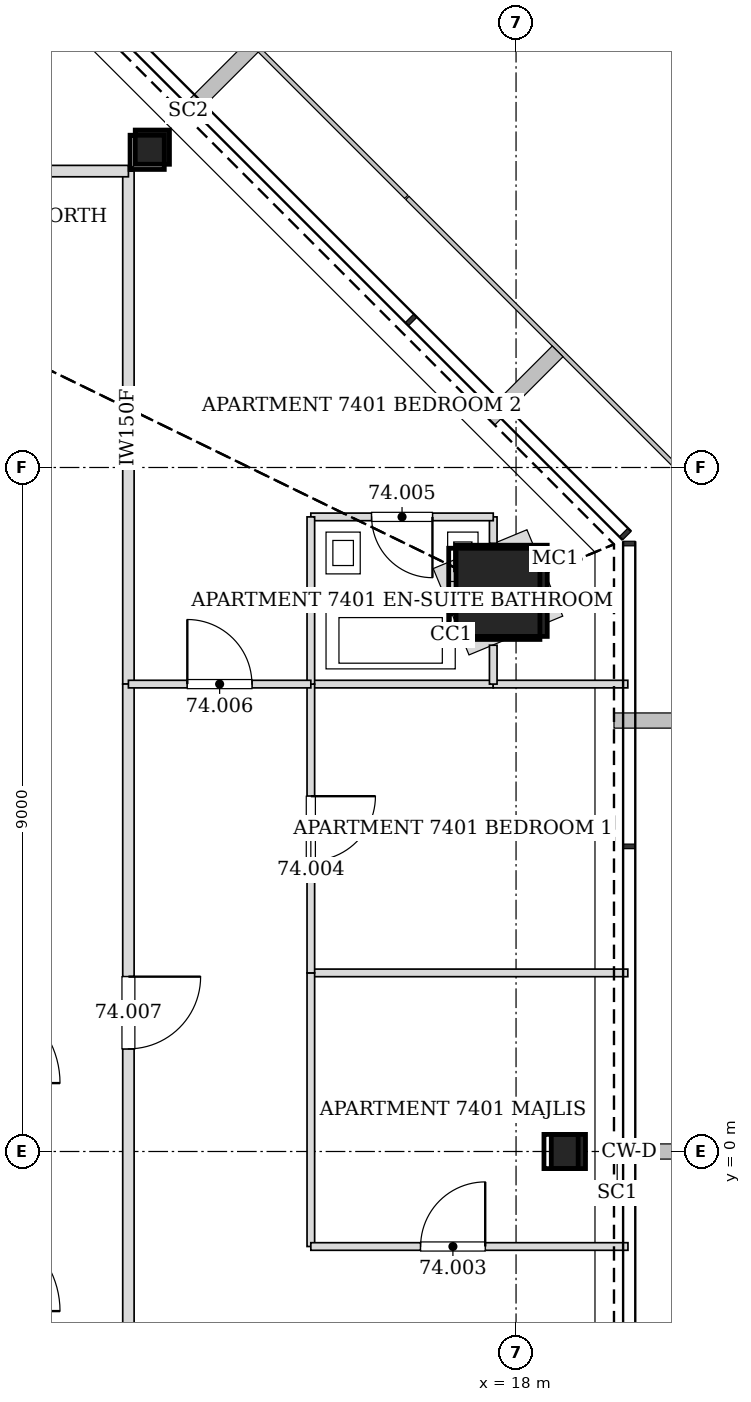
"""IFC4 building model, lengths in metres.
Left out: names, types, materials, properties, quantities, classifications, styles, units other than length and angle.
Written with IfcOpenShell. Run it as: python <this file> out.ifc"""

import sys

from ifc_helpers import new_model, si_unit, direction, frame, frame_2d, origin, origin_2d, place, context, subcontext, project, spatial, rectangle, hollow_rectangle, extrude, element, fill, save


model = new_model("IFC4")
c1 = context("Model", 3, precision=1e-05, world=origin(), true_north=direction((0.0, 1.0)))
c2 = subcontext(c1, "Body", "Model", "MODEL_VIEW")
j1 = project(units=[si_unit("LENGTHUNIT", "METRE"), si_unit("PLANEANGLEUNIT", "RADIAN")], contexts=[c1])
p1 = place(None, origin())
s1 = spatial("IfcSite", under=j1, at=p1, CompositionType="ELEMENT")
p2 = place(p1, origin())
s2 = spatial("IfcBuilding", under=s1, at=p2, CompositionType="ELEMENT")
p3 = place(p2, frame((0.0, 0.0, 301.4)))
s3 = spatial("IfcBuildingStorey", under=s2, at=p3, CompositionType="ELEMENT", Elevation=301.4)
p4 = place(p3, frame((17.81, 7.377, 0.0), z_axis=(-0.028277121884, -0.011698403216, 0.999531666202), x_axis=(0.382282742426, -0.924045401938, 0.0)))
e1 = element("IfcColumn", 1, at=p4, inside=s3, PredefinedType="COLUMN", context=c2, shape_type="SweptSolid", body=[
    extrude(hollow_rectangle(XDim=1.2, YDim=1.2, WallThickness=0.055, at=origin_2d()), origin(), (0.0, 0.0, 1.0), 3.402),
])
for number, where, z_axis, x_axis in (
    (2, (18.688, 0.0, 0.0), (-0.028, 0.0, 1.0), (0.0, -1.0, 0.0)),
    (3, (13.215, 13.215, 0.0), (-0.02, -0.02, 1.0), (0.707, -0.707, 0.0)),
):
    element("IfcColumn", number, at=place(p3, frame(where, z_axis=z_axis, x_axis=x_axis)), inside=s3, PredefinedType="COLUMN", context=c2, shape_type="SweptSolid", body=[
        extrude(hollow_rectangle(XDim=0.45, YDim=0.45, WallThickness=0.02, at=origin_2d()), origin(), (0.0, 0.0, 1.0), 3.402),
    ])
p5 = place(p3, frame((12.9, 6.149, 0.0), z_axis=(0.0, 0.0, 1.0), x_axis=(0.0, 1.0, 0.0)))
e4 = element("IfcWall", 4, at=p5, inside=s3, PredefinedType="PARTITIONING", context=c2, shape_type="SweptSolid", body=[
    extrude(rectangle(XDim=6.751, YDim=0.15, at=frame_2d((3.375, 0.0))), origin(), (0.0, 0.0, 1.0), 2.436),
])
p6 = place(p3, frame((12.9, -2.5, 0.0), z_axis=(0.0, 0.0, 1.0), x_axis=(0.0, 1.0, 0.0)))
e5 = element("IfcWall", 5, at=p6, inside=s3, PredefinedType="PARTITIONING", context=c2, shape_type="SweptSolid", body=[
    extrude(rectangle(XDim=8.651, YDim=0.15, at=frame_2d((4.325, 0.0))), origin(), (0.0, 0.0, 1.0), 2.349),
])
p7 = place(p6, frame((3.851, 0.0, 0.0)))
e6 = element("IfcOpeningElement", 6, at=p7, cuts=e5, PredefinedType="OPENING", context=c2, shape_type="SweptSolid", body=[
    extrude(rectangle(XDim=0.95, YDim=2.1, at=frame_2d((0.475, 1.05))), frame((0.0, 0.085, 0.0), z_axis=(0.0, -1.0, 0.0), x_axis=(1.0, 0.0, 0.0)), (0.0, 0.0, 1.0), 0.17),
])
p8 = place(p3, frame((12.9, 12.9, 0.0), z_axis=(0.0, 0.0, 1.0), x_axis=(-1.0, 0.0, 0.0)))
e7 = element("IfcWall", 7, at=p8, inside=s3, PredefinedType="PARTITIONING", context=c2, shape_type="SweptSolid", body=[
    extrude(rectangle(XDim=6.751, YDim=0.15, at=frame_2d((3.375, 0.0))), origin(), (0.0, 0.0, 1.0), 2.436),
])
p9 = place(p3, frame((19.47, 2.35, 0.0), z_axis=(0.0, 0.0, 1.0), x_axis=(-1.0, 0.0, 0.0)))
e8 = element("IfcWall", 8, at=p9, inside=s3, PredefinedType="PARTITIONING", context=c2, shape_type="SweptSolid", body=[
    extrude(rectangle(XDim=4.17, YDim=0.1, at=frame_2d((2.085, 0.0))), origin(), (0.0, 0.0, 1.0), 2.662),
])
p10 = place(p3, frame((15.3, 2.35, 0.0), z_axis=(0.0, 0.0, 1.0), x_axis=(0.0, -1.0, 0.0)))
e9 = element("IfcWall", 9, at=p10, inside=s3, PredefinedType="PARTITIONING", context=c2, shape_type="SweptSolid", body=[
    extrude(rectangle(XDim=3.6, YDim=0.1, at=frame_2d((1.8, 0.0))), origin(), (0.0, 0.0, 1.0), 2.349),
])
p11 = place(p3, frame((15.3, -1.25, 0.0), z_axis=(0.0, 0.0, 1.0), x_axis=(1.0, 0.0, 0.0)))
e10 = element("IfcWall", 10, at=p11, inside=s3, PredefinedType="PARTITIONING", context=c2, shape_type="SweptSolid", body=[
    extrude(rectangle(XDim=4.172, YDim=0.1, at=frame_2d((2.086, 0.0))), origin(), (0.0, 0.0, 1.0), 2.662),
])
p12 = place(p11, frame((1.444, 0.0, 0.0)))
e11 = element("IfcOpeningElement", 11, at=p12, cuts=e10, PredefinedType="OPENING", context=c2, shape_type="SweptSolid", body=[
    extrude(rectangle(XDim=0.85, YDim=2.1, at=frame_2d((0.425, 1.05))), frame((0.0, 0.06, 0.0), z_axis=(0.0, -1.0, 0.0), x_axis=(1.0, 0.0, 0.0)), (0.0, 0.0, 1.0), 0.12),
])
p13 = place(p3, frame((17.701, 6.15, 0.0), z_axis=(0.0, 0.0, 1.0), x_axis=(-1.0, 0.0, 0.0)))
e12 = element("IfcWall", 12, at=p13, inside=s3, PredefinedType="PARTITIONING", context=c2, shape_type="SweptSolid", body=[
    extrude(rectangle(XDim=2.401, YDim=0.1, at=frame_2d((1.2, 0.0))), origin(), (0.0, 0.0, 1.0), 2.662),
])
p14 = place(p3, frame((19.47, 6.15, 0.0), z_axis=(0.0, 0.0, 1.0), x_axis=(-1.0, 0.0, 0.0)))
e13 = element("IfcWall", 13, at=p14, inside=s3, PredefinedType="PARTITIONING", context=c2, shape_type="SweptSolid", body=[
    extrude(rectangle(XDim=1.771, YDim=0.1, at=frame_2d((0.886, 0.0))), origin(), (0.0, 0.0, 1.0), 2.74),
])
p15 = place(p3, frame((15.3, 6.15, 0.0), z_axis=(0.0, 0.0, 1.0), x_axis=(0.0, -1.0, 0.0)))
e14 = element("IfcWall", 14, at=p15, inside=s3, PredefinedType="PARTITIONING", context=c2, shape_type="SweptSolid", body=[
    extrude(rectangle(XDim=3.8, YDim=0.1, at=frame_2d((1.9, 0.0))), origin(), (0.0, 0.0, 1.0), 3.2),
])
p16 = place(p15, frame((1.475, 0.0, 0.0)))
e15 = element("IfcOpeningElement", 15, at=p16, cuts=e14, PredefinedType="OPENING", context=c2, shape_type="SweptSolid", body=[
    extrude(rectangle(XDim=0.85, YDim=2.1, at=frame_2d((0.425, 1.05))), frame((0.0, 0.06, 0.0), z_axis=(0.0, -1.0, 0.0), x_axis=(1.0, 0.0, 0.0)), (0.0, 0.0, 1.0), 0.12),
])
p17 = place(p3, frame((17.7, 6.15, 0.0), z_axis=(0.0, 0.0, 1.0), x_axis=(0.0, 1.0, 0.0)))
e16 = element("IfcWall", 16, at=p17, inside=s3, PredefinedType="PARTITIONING", context=c2, shape_type="SweptSolid", body=[
    extrude(rectangle(XDim=0.512, YDim=0.1, at=frame_2d((0.256, 0.0))), origin(), (0.0, 0.0, 1.0), 2.74),
])
p18 = place(p3, frame((17.7, 8.002, 0.0), z_axis=(0.0, 0.0, 1.0), x_axis=(0.0, 1.0, 0.0)))
e17 = element("IfcWall", 17, at=p18, inside=s3, PredefinedType="PARTITIONING", context=c2, shape_type="SweptSolid", body=[
    extrude(rectangle(XDim=0.348, YDim=0.1, at=frame_2d((0.174, 0.0))), origin(), (0.0, 0.0, 1.0), 3.2),
])
p19 = place(p3, frame((17.7, 8.35, 0.0), z_axis=(0.0, 0.0, 1.0), x_axis=(-1.0, 0.0, 0.0)))
e18 = element("IfcWall", 18, at=p19, inside=s3, PredefinedType="PARTITIONING", context=c2, shape_type="SweptSolid", body=[
    extrude(rectangle(XDim=2.4, YDim=0.1, at=frame_2d((1.2, 0.0))), origin(), (0.0, 0.0, 1.0), 2.436),
])
p20 = place(p19, frame((0.8, 0.0, 0.0)))
e19 = element("IfcOpeningElement", 19, at=p20, cuts=e18, PredefinedType="OPENING", context=c2, shape_type="SweptSolid", body=[
    extrude(rectangle(XDim=0.8, YDim=2.1, at=frame_2d((0.4, 1.05))), frame((0.0, 0.06, 0.0), z_axis=(0.0, -1.0, 0.0), x_axis=(1.0, 0.0, 0.0)), (0.0, 0.0, 1.0), 0.12),
])
p21 = place(p3, frame((15.3, 8.35, 0.0), z_axis=(0.0, 0.0, 1.0), x_axis=(0.0, -1.0, 0.0)))
e20 = element("IfcWall", 20, at=p21, inside=s3, PredefinedType="PARTITIONING", context=c2, shape_type="SweptSolid", body=[
    extrude(rectangle(XDim=2.2, YDim=0.1, at=frame_2d((1.1, 0.0))), origin(), (0.0, 0.0, 1.0), 3.2),
])
p22 = place(p3, frame((12.9, 6.15, 0.0), z_axis=(0.0, 0.0, 1.0), x_axis=(1.0, 0.0, 0.0)))
e21 = element("IfcWall", 21, at=p22, inside=s3, PredefinedType="PARTITIONING", context=c2, shape_type="SweptSolid", body=[
    extrude(rectangle(XDim=2.4, YDim=0.1, at=frame_2d((1.2, 0.0))), origin(), (0.0, 0.0, 1.0), 2.662),
])
p23 = place(p22, frame((0.775, 0.0, 0.0)))
e22 = element("IfcOpeningElement", 22, at=p23, cuts=e21, PredefinedType="OPENING", context=c2, shape_type="SweptSolid", body=[
    extrude(rectangle(XDim=0.85, YDim=2.1, at=frame_2d((0.425, 1.05))), frame((0.0, 0.06, 0.0), z_axis=(0.0, -1.0, 0.0), x_axis=(1.0, 0.0, 0.0)), (0.0, 0.0, 1.0), 0.12),
])
p24 = place(p12, origin())
e23 = element("IfcDoor", 23, at=p24, inside=s3, OperationType="SINGLE_SWING_RIGHT", PredefinedType="DOOR", context=c2, shape_type="SweptSolid", body=[
    extrude(rectangle(XDim=0.85, YDim=2.1, at=frame_2d((0.425, 1.05))), frame((0.0, 0.025, 0.0), z_axis=(0.0, -1.0, 0.0), x_axis=(1.0, 0.0, 0.0)), (0.0, 0.0, 1.0), 0.05),
])
fill(e11, e23)
p25 = place(p16, origin())
e24 = element("IfcDoor", 24, at=p25, inside=s3, OperationType="SINGLE_SWING_LEFT", PredefinedType="DOOR", context=c2, shape_type="SweptSolid", body=[
    extrude(rectangle(XDim=0.85, YDim=2.1, at=frame_2d((0.425, 1.05))), frame((0.0, 0.025, 0.0), z_axis=(0.0, -1.0, 0.0), x_axis=(1.0, 0.0, 0.0)), (0.0, 0.0, 1.0), 0.05),
])
fill(e15, e24)
p26 = place(p20, origin())
e25 = element("IfcDoor", 25, at=p26, inside=s3, OperationType="SINGLE_SWING_LEFT", PredefinedType="DOOR", context=c2, shape_type="SweptSolid", body=[
    extrude(rectangle(XDim=0.8, YDim=2.1, at=frame_2d((0.4, 1.05))), frame((0.0, 0.025, 0.0), z_axis=(0.0, -1.0, 0.0), x_axis=(1.0, 0.0, 0.0)), (0.0, 0.0, 1.0), 0.05),
])
fill(e19, e25)
p27 = place(p23, origin())
e26 = element("IfcDoor", 26, at=p27, inside=s3, OperationType="SINGLE_SWING_LEFT", PredefinedType="DOOR", context=c2, shape_type="SweptSolid", body=[
    extrude(rectangle(XDim=0.85, YDim=2.1, at=frame_2d((0.425, 1.05))), frame((0.0, 0.025, 0.0), z_axis=(0.0, -1.0, 0.0), x_axis=(1.0, 0.0, 0.0)), (0.0, 0.0, 1.0), 0.05),
])
fill(e22, e26)
p28 = place(p7, frame((0.95, 0.0, 0.0), z_axis=(0.0, 0.0, 1.0), x_axis=(-1.0, 0.0, 0.0)))
e27 = element("IfcDoor", 27, at=p28, inside=s3, OperationType="SINGLE_SWING_LEFT", PredefinedType="DOOR", context=c2, shape_type="SweptSolid", body=[
    extrude(rectangle(XDim=0.95, YDim=2.1, at=frame_2d((0.475, 1.05))), frame((0.0, 0.025, 0.0), z_axis=(0.0, -1.0, 0.0), x_axis=(1.0, 0.0, 0.0)), (0.0, 0.0, 1.0), 0.05),
])
fill(e6, e27)
save(model, sys.argv[1])
